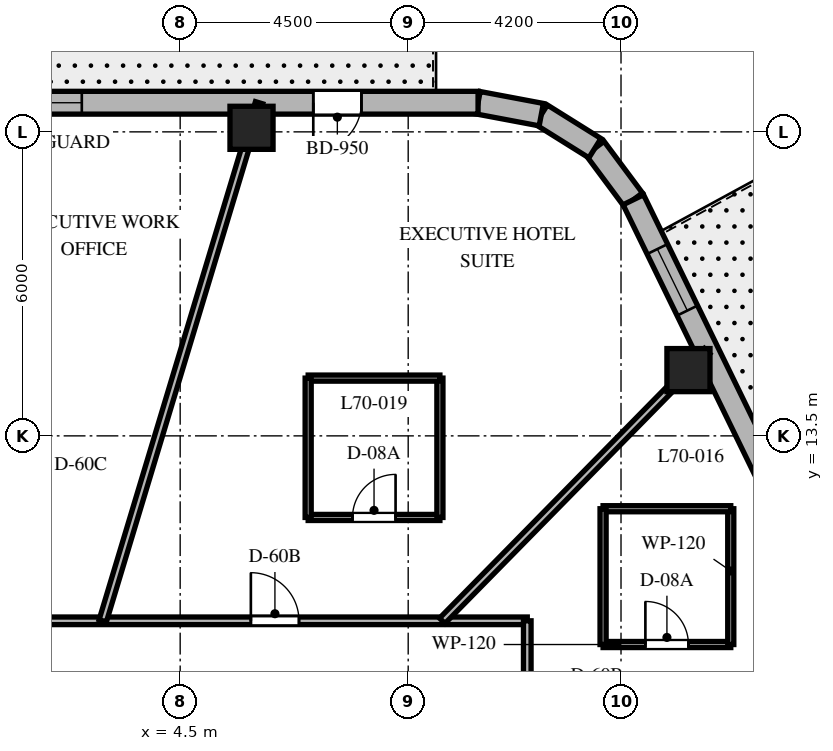
"""IFC4 building model, lengths in metres.
Left out: names, types, materials, properties, quantities, classifications, styles, units other than length and angle.
Written with IfcOpenShell. Run it as: python <this file> out.ifc"""

import sys

from ifc_helpers import new_model, si_unit, direction, frame, frame_2d, origin, origin_2d, place, context, subcontext, project, spatial, rectangle, extrude, element, fill, save


model = new_model("IFC4")
c1 = context("Model", 3, precision=1e-05, world=origin(), true_north=direction((0.0, 1.0)))
c2 = subcontext(c1, "Body", "Model", "MODEL_VIEW")
j1 = project(units=[si_unit("LENGTHUNIT", "METRE"), si_unit("PLANEANGLEUNIT", "RADIAN")], contexts=[c1])
p1 = place(None, origin())
s1 = spatial("IfcSite", under=j1, at=p1, CompositionType="ELEMENT")
p2 = place(p1, origin())
s2 = spatial("IfcBuilding", under=s1, at=p2, CompositionType="ELEMENT")
p3 = place(p2, frame((0.0, 0.0, 280.8)))
s3 = spatial("IfcBuildingStorey", under=s2, at=p3, CompositionType="ELEMENT", Elevation=280.8)
for number, where, z_axis, x_axis in (
    (1, (14.531, 14.798, 0.0), (0.0, 0.0, 1.0), (1.0, 0.0, 0.0)),
    (2, (5.908, 19.58, 0.0), (0.0, 0.0, 1.0), (1.0, 0.0, 0.0)),
):
    element("IfcColumn", number, at=place(p3, frame(where, z_axis=z_axis, x_axis=x_axis)), inside=s3, PredefinedType="COLUMN", context=c2, shape_type="SweptSolid", body=[
        extrude(rectangle(XDim=0.85, YDim=0.85, at=origin_2d()), origin(), (0.0, 0.0, 1.0), 3.9),
    ])
p4 = place(p3, frame((13.443, 18.16, 0.0), z_axis=(0.0, 0.0, 1.0), x_axis=(-0.597042425808, 0.802209661987, 0.0)))
e3 = element("IfcWall", 3, at=p4, inside=s3, PredefinedType="SOLIDWALL", context=c2, shape_type="SweptSolid", body=[
    extrude(rectangle(XDim=1.27, YDim=0.45, at=frame_2d((0.635, 0.0))), origin(), (0.0, 0.0, 1.0), 3.6),
])
p5 = place(p3, frame((12.685, 19.178, 0.0), z_axis=(0.0, 0.0, 1.0), x_axis=(-0.848031272749, 0.529946186362, 0.0)))
e4 = element("IfcWall", 4, at=p5, inside=s3, PredefinedType="SOLIDWALL", context=c2, shape_type="SweptSolid", body=[
    extrude(rectangle(XDim=1.248, YDim=0.45, at=frame_2d((0.624, 0.0))), origin(), (0.0, 0.0, 1.0), 3.6),
])
p6 = place(p3, frame((11.626, 19.84, 0.0), z_axis=(0.0, 0.0, 1.0), x_axis=(-0.982701956681, 0.185194126083, 0.0)))
e5 = element("IfcWall", 5, at=p6, inside=s3, PredefinedType="SOLIDWALL", context=c2, shape_type="SweptSolid", body=[
    extrude(rectangle(XDim=1.27, YDim=0.45, at=frame_2d((0.635, 0.0))), origin(), (0.0, 0.0, 1.0), 3.6),
])
p7 = place(p3, frame((21.138, 2.371, 0.0), z_axis=(0.0, 0.0, 1.0), x_axis=(-0.438128124058, 0.89891253574, 0.0)))
e6 = element("IfcWall", 6, at=p7, inside=s3, PredefinedType="SOLIDWALL", context=c2, shape_type="SweptSolid", body=[
    extrude(rectangle(XDim=17.565, YDim=0.45, at=frame_2d((8.782, 0.0))), origin(), (0.0, 0.0, 1.0), 3.6),
])
p8 = place(p7, frame((4.769, 0.0, 0.0)))
e7 = element("IfcOpeningElement", 7, at=p8, cuts=e6, PredefinedType="OPENING", context=c2, shape_type="SweptSolid", body=[
    extrude(rectangle(XDim=1.0, YDim=2.15, at=frame_2d((0.5, 1.075))), frame((0.0, 0.235, 0.0), z_axis=(0.0, -1.0, 0.0), x_axis=(1.0, 0.0, 0.0)), (0.0, 0.0, 1.0), 0.47),
])
p9 = place(p7, frame((10.243, 0.0, 0.8)))
e8 = element("IfcOpeningElement", 8, at=p9, cuts=e6, PredefinedType="OPENING", context=c2, shape_type="SweptSolid", body=[
    extrude(rectangle(XDim=1.35, YDim=1.75, at=frame_2d((0.675, 0.875))), frame((0.0, 0.235, 0.0), z_axis=(0.0, -1.0, 0.0), x_axis=(1.0, 0.0, 0.0)), (0.0, 0.0, 1.0), 0.47),
])
p10 = place(p7, frame((15.132, 0.0, 0.8)))
e9 = element("IfcOpeningElement", 9, at=p10, cuts=e6, PredefinedType="OPENING", context=c2, shape_type="SweptSolid", body=[
    extrude(rectangle(XDim=1.35, YDim=1.75, at=frame_2d((0.675, 0.875))), frame((0.0, 0.235, 0.0), z_axis=(0.0, -1.0, 0.0), x_axis=(1.0, 0.0, 0.0)), (0.0, 0.0, 1.0), 0.47),
])
p11 = place(p7, frame((1.133, 0.0, 0.8)))
e10 = element("IfcOpeningElement", 10, at=p11, cuts=e6, PredefinedType="OPENING", context=c2, shape_type="SweptSolid", body=[
    extrude(rectangle(XDim=1.35, YDim=1.75, at=frame_2d((0.675, 0.875))), frame((0.0, 0.235, 0.0), z_axis=(0.0, -1.0, 0.0), x_axis=(1.0, 0.0, 0.0)), (0.0, 0.0, 1.0), 0.47),
])
p12 = place(p3, frame((10.379, 20.075, 0.0), z_axis=(0.0, 0.0, 1.0), x_axis=(-1.0, 0.0, 0.0)))
e11 = element("IfcWall", 11, at=p12, inside=s3, PredefinedType="SOLIDWALL", context=c2, shape_type="SweptSolid", body=[
    extrude(rectangle(XDim=22.417, YDim=0.45, at=frame_2d((11.208, 0.0))), origin(), (0.0, 0.0, 1.0), 3.6),
])
p13 = place(p12, frame((2.302, 0.0, 0.0)))
e12 = element("IfcOpeningElement", 12, at=p13, cuts=e11, PredefinedType="OPENING", context=c2, shape_type="SweptSolid", body=[
    extrude(rectangle(XDim=0.95, YDim=2.15, at=frame_2d((0.475, 1.075))), frame((0.0, 0.235, 0.0), z_axis=(0.0, -1.0, 0.0), x_axis=(1.0, 0.0, 0.0)), (0.0, 0.0, 1.0), 0.47),
])
p14 = place(p12, frame((7.82, 0.0, 0.8)))
e13 = element("IfcOpeningElement", 13, at=p14, cuts=e11, PredefinedType="OPENING", context=c2, shape_type="SweptSolid", body=[
    extrude(rectangle(XDim=1.35, YDim=1.75, at=frame_2d((0.675, 0.875))), frame((0.0, 0.235, 0.0), z_axis=(0.0, -1.0, 0.0), x_axis=(1.0, 0.0, 0.0)), (0.0, 0.0, 1.0), 0.47),
])
p15 = place(p12, frame((13.978, 0.0, 0.8)))
e14 = element("IfcOpeningElement", 14, at=p15, cuts=e11, PredefinedType="OPENING", context=c2, shape_type="SweptSolid", body=[
    extrude(rectangle(XDim=1.35, YDim=1.75, at=frame_2d((0.675, 0.875))), frame((0.0, 0.235, 0.0), z_axis=(0.0, -1.0, 0.0), x_axis=(1.0, 0.0, 0.0)), (0.0, 0.0, 1.0), 0.47),
])
p16 = place(p12, frame((19.587, 0.0, 0.8)))
e15 = element("IfcOpeningElement", 15, at=p16, cuts=e11, PredefinedType="OPENING", context=c2, shape_type="SweptSolid", body=[
    extrude(rectangle(XDim=1.35, YDim=1.75, at=frame_2d((0.675, 0.875))), frame((0.0, 0.235, 0.0), z_axis=(0.0, -1.0, 0.0), x_axis=(1.0, 0.0, 0.0)), (0.0, 0.0, 1.0), 0.47),
])
p17 = place(p3, frame((0.92, 9.85, 0.0), z_axis=(0.0, 0.0, 1.0), x_axis=(1.0, 0.0, 0.0)))
e16 = element("IfcWall", 16, at=p17, inside=s3, PredefinedType="PARTITIONING", context=c2, shape_type="SweptSolid", body=[
    extrude(rectangle(XDim=10.43, YDim=0.15, at=frame_2d((5.215, 0.0))), origin(), (0.0, 0.0, 1.0), 3.09),
])
p18 = place(p17, frame((4.975, 0.0, 0.0)))
e17 = element("IfcOpeningElement", 17, at=p18, cuts=e16, PredefinedType="OPENING", context=c2, shape_type="SweptSolid", body=[
    extrude(rectangle(XDim=0.95, YDim=2.03, at=frame_2d((0.475, 1.015))), frame((0.0, 0.085, 0.0), z_axis=(0.0, -1.0, 0.0), x_axis=(1.0, 0.0, 0.0)), (0.0, 0.0, 1.0), 0.17),
])
p19 = place(p3, frame((11.35, 9.85, 0.0), z_axis=(0.0, 0.0, 1.0), x_axis=(0.0, -1.0, 0.0)))
e18 = element("IfcWall", 18, at=p19, inside=s3, PredefinedType="PARTITIONING", context=c2, shape_type="SweptSolid", body=[
    extrude(rectangle(XDim=12.4, YDim=0.15, at=frame_2d((6.2, 0.0))), origin(), (0.0, 0.0, 1.0), 3.09),
])
p20 = place(p19, frame((4.705, 0.0, 0.0)))
e19 = element("IfcOpeningElement", 19, at=p20, cuts=e18, PredefinedType="OPENING", context=c2, shape_type="SweptSolid", body=[
    extrude(rectangle(XDim=0.9, YDim=2.03, at=frame_2d((0.45, 1.015))), frame((0.0, 0.085, 0.0), z_axis=(0.0, -1.0, 0.0), x_axis=(1.0, 0.0, 0.0)), (0.0, 0.0, 1.0), 0.17),
])
p21 = place(p19, frame((1.463, 0.0, 0.0)))
e20 = element("IfcOpeningElement", 20, at=p21, cuts=e18, PredefinedType="OPENING", context=c2, shape_type="SweptSolid", body=[
    extrude(rectangle(XDim=0.95, YDim=2.03, at=frame_2d((0.475, 1.015))), frame((0.0, 0.085, 0.0), z_axis=(0.0, -1.0, 0.0), x_axis=(1.0, 0.0, 0.0)), (0.0, 0.0, 1.0), 0.17),
])
p22 = place(p19, frame((8.835, 0.0, 0.0)))
e21 = element("IfcOpeningElement", 21, at=p22, cuts=e18, PredefinedType="OPENING", context=c2, shape_type="SweptSolid", body=[
    extrude(rectangle(XDim=0.95, YDim=2.03, at=frame_2d((0.475, 1.015))), frame((0.0, 0.085, 0.0), z_axis=(0.0, -1.0, 0.0), x_axis=(1.0, 0.0, 0.0)), (0.0, 0.0, 1.0), 0.17),
])
p23 = place(p3, frame((11.35, 6.213, 0.0), z_axis=(0.0, 0.0, 1.0), x_axis=(0.877157109774, 0.480203503499, 0.0)))
e22 = element("IfcWall", 22, at=p23, inside=s3, PredefinedType="PARTITIONING", context=c2, shape_type="SweptSolid", body=[
    extrude(rectangle(XDim=7.123, YDim=0.15, at=frame_2d((3.562, 0.0))), origin(), (0.0, 0.0, 1.0), 2.94),
])
p24 = place(p3, frame((9.672, 9.85, 0.0), z_axis=(0.0, 0.0, 1.0), x_axis=(0.700629771301, 0.713524998558, 0.0)))
e23 = element("IfcWall", 23, at=p24, inside=s3, PredefinedType="PARTITIONING", context=c2, shape_type="SweptSolid", body=[
    extrude(rectangle(XDim=7.459, YDim=0.15, at=frame_2d((3.73, 0.0))), origin(), (0.0, 0.0, 1.0), 2.94),
])
p25 = place(p3, frame((2.972, 9.85, 0.0), z_axis=(0.0, 0.0, 1.0), x_axis=(0.288872169679, 0.957367677324, 0.0)))
e24 = element("IfcWall", 24, at=p25, inside=s3, PredefinedType="PARTITIONING", context=c2, shape_type="SweptSolid", body=[
    extrude(rectangle(XDim=10.68, YDim=0.15, at=frame_2d((5.34, 0.0))), origin(), (0.0, 0.0, 1.0), 2.94),
])
p26 = place(p3, frame((12.846, 9.382, 0.0), z_axis=(0.0, 0.0, 1.0), x_axis=(1.0, 0.0, 0.0)))
e25 = element("IfcWall", 25, at=p26, inside=s3, PredefinedType="PARTITIONING", context=c2, shape_type="SweptSolid", body=[
    extrude(rectangle(XDim=2.52, YDim=0.12, at=frame_2d((1.26, 0.0))), origin(), (0.0, 0.0, 1.0), 3.126),
])
p27 = place(p26, frame((0.835, 0.0, 0.0)))
e26 = element("IfcOpeningElement", 26, at=p27, cuts=e25, PredefinedType="OPENING", context=c2, shape_type="SweptSolid", body=[
    extrude(rectangle(XDim=0.85, YDim=2.03, at=frame_2d((0.425, 1.015))), frame((0.0, 0.07, 0.0), z_axis=(0.0, -1.0, 0.0), x_axis=(1.0, 0.0, 0.0)), (0.0, 0.0, 1.0), 0.14),
])
p28 = place(p3, frame((15.366, 9.382, 0.0), z_axis=(0.0, 0.0, 1.0), x_axis=(0.0, 1.0, 0.0)))
e27 = element("IfcWall", 27, at=p28, inside=s3, PredefinedType="PARTITIONING", context=c2, shape_type="SweptSolid", body=[
    extrude(rectangle(XDim=2.68, YDim=0.12, at=frame_2d((1.34, 0.0))), origin(), (0.0, 0.0, 1.0), 3.6),
])
p29 = place(p3, frame((15.366, 12.062, 0.0), z_axis=(0.0, 0.0, 1.0), x_axis=(-1.0, 0.0, 0.0)))
e28 = element("IfcWall", 28, at=p29, inside=s3, PredefinedType="PARTITIONING", context=c2, shape_type="SweptSolid", body=[
    extrude(rectangle(XDim=2.52, YDim=0.12, at=frame_2d((1.26, 0.0))), origin(), (0.0, 0.0, 1.0), 3.126),
])
p30 = place(p3, frame((12.846, 12.062, 0.0), z_axis=(0.0, 0.0, 1.0), x_axis=(0.0, -1.0, 0.0)))
e29 = element("IfcWall", 29, at=p30, inside=s3, PredefinedType="PARTITIONING", context=c2, shape_type="SweptSolid", body=[
    extrude(rectangle(XDim=2.68, YDim=0.12, at=frame_2d((1.34, 0.0))), origin(), (0.0, 0.0, 1.0), 3.126),
])
p31 = place(p3, frame((7.026, 11.89, 0.0), z_axis=(0.0, 0.0, 1.0), x_axis=(1.0, 0.0, 0.0)))
e30 = element("IfcWall", 30, at=p31, inside=s3, PredefinedType="PARTITIONING", context=c2, shape_type="SweptSolid", body=[
    extrude(rectangle(XDim=2.6, YDim=0.12, at=frame_2d((1.3, 0.0))), origin(), (0.0, 0.0, 1.0), 3.041),
])
p32 = place(p31, frame((0.875, 0.0, 0.0)))
e31 = element("IfcOpeningElement", 31, at=p32, cuts=e30, PredefinedType="OPENING", context=c2, shape_type="SweptSolid", body=[
    extrude(rectangle(XDim=0.85, YDim=2.03, at=frame_2d((0.425, 1.015))), frame((0.0, 0.07, 0.0), z_axis=(0.0, -1.0, 0.0), x_axis=(1.0, 0.0, 0.0)), (0.0, 0.0, 1.0), 0.14),
])
p33 = place(p3, frame((9.626, 11.89, 0.0), z_axis=(0.0, 0.0, 1.0), x_axis=(0.0, 1.0, 0.0)))
e32 = element("IfcWall", 32, at=p33, inside=s3, PredefinedType="PARTITIONING", context=c2, shape_type="SweptSolid", body=[
    extrude(rectangle(XDim=2.75, YDim=0.12, at=frame_2d((1.375, 0.0))), origin(), (0.0, 0.0, 1.0), 3.172),
])
p34 = place(p3, frame((9.626, 14.64, 0.0), z_axis=(0.0, 0.0, 1.0), x_axis=(-1.0, 0.0, 0.0)))
e33 = element("IfcWall", 33, at=p34, inside=s3, PredefinedType="PARTITIONING", context=c2, shape_type="SweptSolid", body=[
    extrude(rectangle(XDim=2.6, YDim=0.12, at=frame_2d((1.3, 0.0))), origin(), (0.0, 0.0, 1.0), 3.172),
])
p35 = place(p3, frame((7.026, 14.64, 0.0), z_axis=(0.0, 0.0, 1.0), x_axis=(0.0, -1.0, 0.0)))
e34 = element("IfcWall", 34, at=p35, inside=s3, PredefinedType="PARTITIONING", context=c2, shape_type="SweptSolid", body=[
    extrude(rectangle(XDim=2.75, YDim=0.12, at=frame_2d((1.375, 0.0))), origin(), (0.0, 0.0, 1.0), 3.041),
])
p36 = place(p10, origin())
e35 = element("IfcWindow", 35, at=p36, inside=s3, PartitioningType="SINGLE_PANEL", PredefinedType="WINDOW", context=c2, shape_type="SweptSolid", body=[
    extrude(rectangle(XDim=1.35, YDim=1.75, at=frame_2d((0.675, 0.875))), frame((0.0, 0.03, 0.0), z_axis=(0.0, -1.0, 0.0), x_axis=(1.0, 0.0, 0.0)), (0.0, 0.0, 1.0), 0.06),
])
fill(e9, e35)
p37 = place(p13, origin())
e36 = element("IfcDoor", 36, at=p37, inside=s3, OperationType="SINGLE_SWING_RIGHT", PredefinedType="DOOR", context=c2, shape_type="SweptSolid", body=[
    extrude(rectangle(XDim=0.95, YDim=2.15, at=frame_2d((0.475, 1.075))), frame((0.0, 0.025, 0.0), z_axis=(0.0, -1.0, 0.0), x_axis=(1.0, 0.0, 0.0)), (0.0, 0.0, 1.0), 0.05),
])
fill(e12, e36)
p38 = place(p14, origin())
e37 = element("IfcWindow", 37, at=p38, inside=s3, PartitioningType="SINGLE_PANEL", PredefinedType="WINDOW", context=c2, shape_type="SweptSolid", body=[
    extrude(rectangle(XDim=1.35, YDim=1.75, at=frame_2d((0.675, 0.875))), frame((0.0, 0.03, 0.0), z_axis=(0.0, -1.0, 0.0), x_axis=(1.0, 0.0, 0.0)), (0.0, 0.0, 1.0), 0.06),
])
fill(e13, e37)
p39 = place(p27, origin())
e38 = element("IfcDoor", 38, at=p39, inside=s3, OperationType="SINGLE_SWING_LEFT", PredefinedType="DOOR", context=c2, shape_type="SweptSolid", body=[
    extrude(rectangle(XDim=0.85, YDim=2.03, at=frame_2d((0.425, 1.015))), frame((0.0, 0.025, 0.0), z_axis=(0.0, -1.0, 0.0), x_axis=(1.0, 0.0, 0.0)), (0.0, 0.0, 1.0), 0.05),
])
fill(e26, e38)
p40 = place(p18, origin())
e39 = element("IfcDoor", 39, at=p40, inside=s3, OperationType="SINGLE_SWING_LEFT", PredefinedType="DOOR", context=c2, shape_type="SweptSolid", body=[
    extrude(rectangle(XDim=0.95, YDim=2.03, at=frame_2d((0.475, 1.015))), frame((0.0, 0.025, 0.0), z_axis=(0.0, -1.0, 0.0), x_axis=(1.0, 0.0, 0.0)), (0.0, 0.0, 1.0), 0.05),
])
fill(e17, e39)
p41 = place(p32, origin())
e40 = element("IfcDoor", 40, at=p41, inside=s3, OperationType="SINGLE_SWING_RIGHT", PredefinedType="DOOR", context=c2, shape_type="SweptSolid", body=[
    extrude(rectangle(XDim=0.85, YDim=2.03, at=frame_2d((0.425, 1.015))), frame((0.0, 0.025, 0.0), z_axis=(0.0, -1.0, 0.0), x_axis=(1.0, 0.0, 0.0)), (0.0, 0.0, 1.0), 0.05),
])
fill(e31, e40)
save(model, sys.argv[1])
